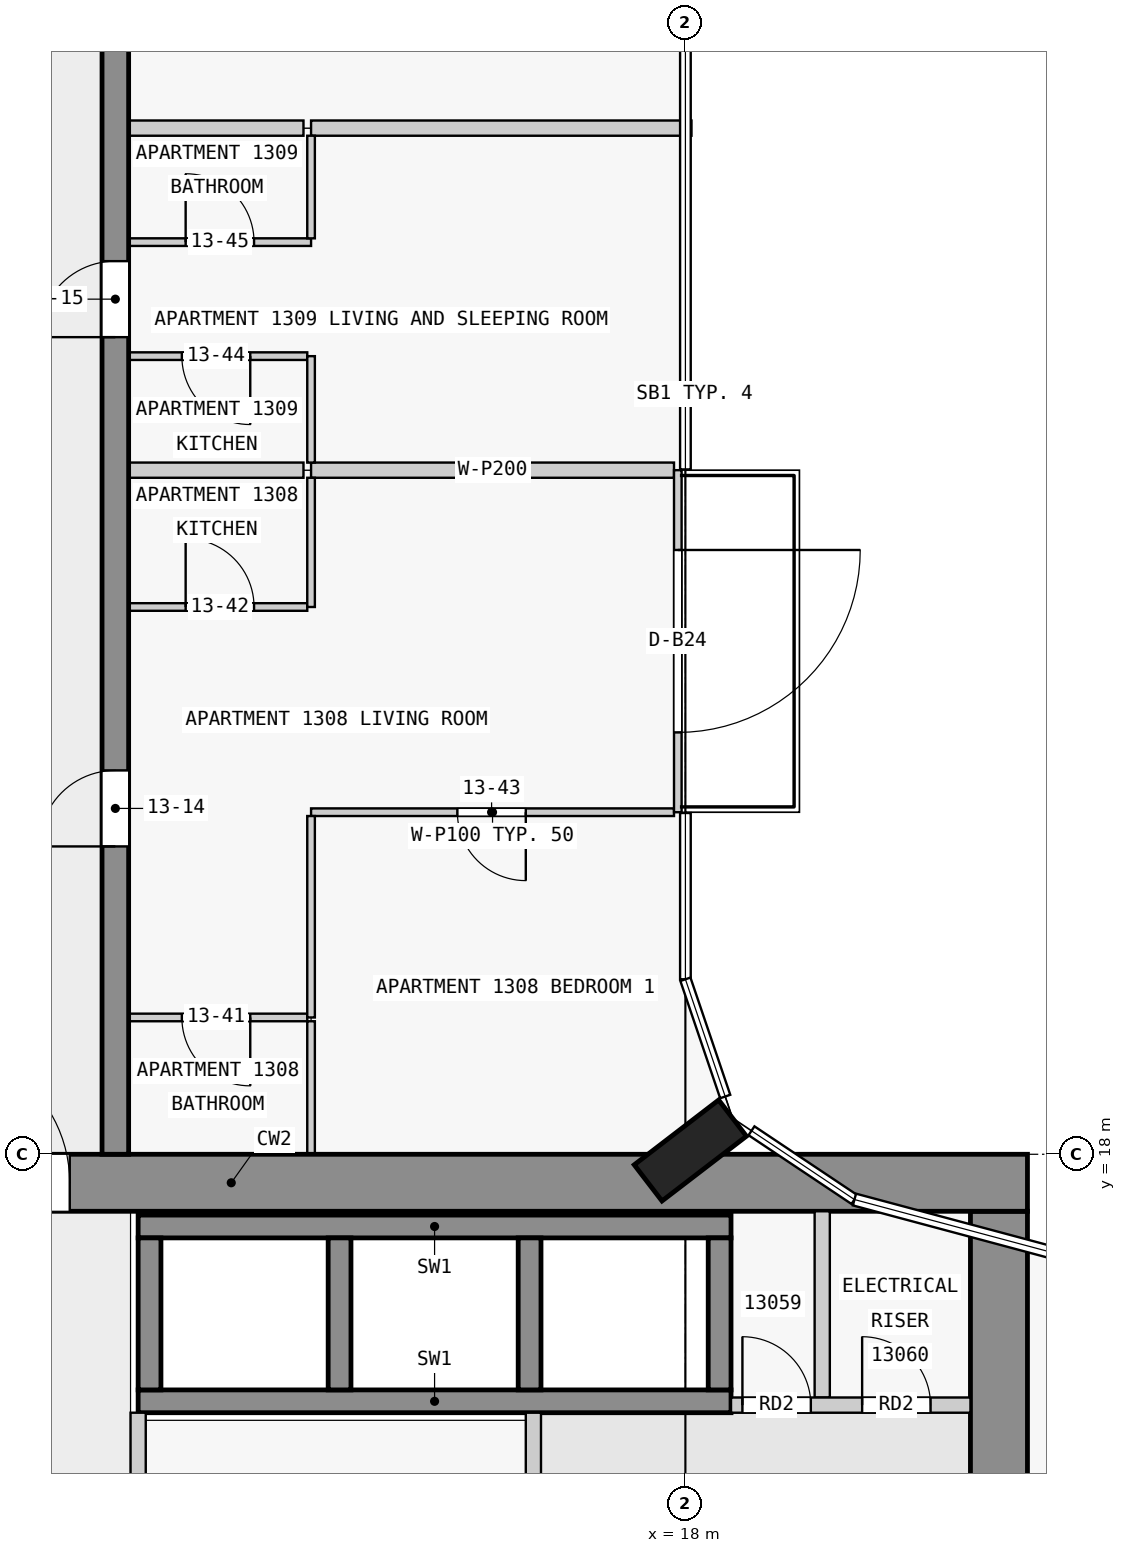
"""IFC4 building model, lengths in metres.
Left out: names, types, materials, properties, quantities, classifications, styles, units other than length and angle.
Written with IfcOpenShell. Run it as: python <this file> out.ifc"""

import sys

from ifc_helpers import new_model, si_unit, direction, frame, frame_2d, origin, origin_2d, place, context, subcontext, project, spatial, rectangle, extrude, element, fill, save


model = new_model("IFC4")
c1 = context("Model", 3, precision=1e-05, world=origin(), true_north=direction((0.0, 1.0)))
c2 = subcontext(c1, "Body", "Model", "MODEL_VIEW")
j1 = project(units=[si_unit("LENGTHUNIT", "METRE"), si_unit("PLANEANGLEUNIT", "RADIAN")], contexts=[c1])
p1 = place(None, origin())
s1 = spatial("IfcSite", under=j1, at=p1, CompositionType="ELEMENT")
p2 = place(p1, origin())
s2 = spatial("IfcBuilding", under=s1, at=p2, CompositionType="ELEMENT")
p3 = place(p2, frame((0.0, 0.0, 54.8)))
s3 = spatial("IfcBuildingStorey", under=s2, at=p3, CompositionType="ELEMENT", Elevation=54.8)
p4 = place(p3, frame((18.065, 18.05, 0.0), z_axis=(0.0, 0.0, 1.0), x_axis=(-0.608810846443, 0.793315418515, 0.0)))
e1 = element("IfcColumn", 1, at=p4, inside=s3, PredefinedType="COLUMN", context=c2, shape_type="SweptSolid", body=[
    extrude(rectangle(XDim=0.6, YDim=1.4, at=origin_2d()), origin(), (0.0, 0.0, 1.0), 3.5),
])
p5 = place(p3, frame((1.55, 17.625, 0.0), z_axis=(0.0, 0.0, 1.0), x_axis=(1.0, 0.0, 0.0)))
e2 = element("IfcWall", 2, at=p5, inside=s3, PredefinedType="SHEAR", context=c2, shape_type="SweptSolid", body=[
    extrude(rectangle(XDim=20.95, YDim=0.75, at=frame_2d((10.475, 0.0))), origin(), (0.0, 0.0, 1.0), 3.25),
])
p6 = place(p5, frame((6.55, 0.0, 0.0)))
e3 = element("IfcOpeningElement", 3, at=p6, cuts=e2, PredefinedType="OPENING", context=c2, shape_type="SweptSolid", body=[
    extrude(rectangle(XDim=1.8, YDim=2.1, at=frame_2d((0.9, 1.05))), frame((0.0, 0.385, 0.0), z_axis=(0.0, -1.0, 0.0), x_axis=(1.0, 0.0, 0.0)), (0.0, 0.0, 1.0), 0.77),
])
p7 = place(p3, frame((22.125, 2.5, 0.0), z_axis=(0.0, 0.0, 1.0), x_axis=(0.0, 1.0, 0.0)))
e4 = element("IfcWall", 4, at=p7, inside=s3, PredefinedType="SHEAR", context=c2, shape_type="SweptSolid", body=[
    extrude(rectangle(XDim=14.75, YDim=0.75, at=frame_2d((7.375, 0.0))), origin(), (0.0, 0.0, 1.0), 3.25),
])
p8 = place(p7, frame((5.6, 0.0, 0.0)))
e5 = element("IfcOpeningElement", 5, at=p8, cuts=e4, PredefinedType="OPENING", context=c2, shape_type="SweptSolid", body=[
    extrude(rectangle(XDim=1.8, YDim=2.1, at=frame_2d((0.9, 1.05))), frame((0.0, 0.385, 0.0), z_axis=(0.0, -1.0, 0.0), x_axis=(1.0, 0.0, 0.0)), (0.0, 0.0, 1.0), 0.77),
])
for number, where, z_axis, x_axis in (
    (6, (10.8, 17.05, 0.0), (0.0, 0.0, 1.0), (1.0, 0.0, 0.0)),
    (7, (10.8, 14.75, 0.0), (0.0, 0.0, 1.0), (1.0, 0.0, 0.0)),
):
    element("IfcWall", number, at=place(p3, frame(where, z_axis=z_axis, x_axis=x_axis)), inside=s3, PredefinedType="SHEAR", context=c2, shape_type="SweptSolid", body=[
        extrude(rectangle(XDim=7.8, YDim=0.3, at=frame_2d((3.9, 0.0))), origin(), (0.0, 0.0, 1.0), 3.25),
    ])
for number, where, z_axis, x_axis in (
    (8, (10.95, 14.9, 0.0), (0.0, 0.0, 1.0), (0.0, 1.0, 0.0)),
    (9, (13.45, 14.9, 0.0), (0.0, 0.0, 1.0), (0.0, 1.0, 0.0)),
    (10, (15.95, 14.9, 0.0), (0.0, 0.0, 1.0), (0.0, 1.0, 0.0)),
    (11, (18.45, 14.9, 0.0), (0.0, 0.0, 1.0), (0.0, 1.0, 0.0)),
):
    element("IfcWall", number, at=place(p3, frame(where, z_axis=z_axis, x_axis=x_axis)), inside=s3, PredefinedType="SHEAR", context=c2, shape_type="SweptSolid", body=[
        extrude(rectangle(XDim=2.0, YDim=0.3, at=frame_2d((1.0, 0.0))), origin(), (0.0, 0.0, 1.0), 3.25),
    ])
p9 = place(p3, frame((10.5, 18.0, 0.0), z_axis=(0.0, 0.0, 1.0), x_axis=(0.0, 1.0, 0.0)))
e12 = element("IfcWall", 12, at=p9, inside=s3, PredefinedType="SHEAR", context=c2, shape_type="SweptSolid", body=[
    extrude(rectangle(XDim=27.0, YDim=0.35, at=frame_2d((13.5, 0.0))), origin(), (0.0, 0.0, 1.0), 3.25),
])
p10 = place(p9, frame((4.05, 0.0, 0.0)))
e13 = element("IfcOpeningElement", 13, at=p10, cuts=e12, PredefinedType="OPENING", context=c2, shape_type="SweptSolid", body=[
    extrude(rectangle(XDim=1.0, YDim=2.1, at=frame_2d((0.5, 1.05))), frame((0.0, 0.185, 0.0), z_axis=(0.0, -1.0, 0.0), x_axis=(1.0, 0.0, 0.0)), (0.0, 0.0, 1.0), 0.37),
])
p11 = place(p9, frame((10.75, 0.0, 0.0)))
e14 = element("IfcOpeningElement", 14, at=p11, cuts=e12, PredefinedType="OPENING", context=c2, shape_type="SweptSolid", body=[
    extrude(rectangle(XDim=1.0, YDim=2.1, at=frame_2d((0.5, 1.05))), frame((0.0, 0.185, 0.0), z_axis=(0.0, -1.0, 0.0), x_axis=(1.0, 0.0, 0.0)), (0.0, 0.0, 1.0), 0.37),
])
p12 = place(p9, frame((15.25, 0.0, 0.0)))
e15 = element("IfcOpeningElement", 15, at=p12, cuts=e12, PredefinedType="OPENING", context=c2, shape_type="SweptSolid", body=[
    extrude(rectangle(XDim=1.0, YDim=2.1, at=frame_2d((0.5, 1.05))), frame((0.0, 0.185, 0.0), z_axis=(0.0, -1.0, 0.0), x_axis=(1.0, 0.0, 0.0)), (0.0, 0.0, 1.0), 0.37),
])
p13 = place(p9, frame((19.75, 0.0, 0.0)))
e16 = element("IfcOpeningElement", 16, at=p13, cuts=e12, PredefinedType="OPENING", context=c2, shape_type="SweptSolid", body=[
    extrude(rectangle(XDim=1.0, YDim=2.1, at=frame_2d((0.5, 1.05))), frame((0.0, 0.185, 0.0), z_axis=(0.0, -1.0, 0.0), x_axis=(1.0, 0.0, 0.0)), (0.0, 0.0, 1.0), 0.37),
])
p14 = place(p9, frame((23.25, 0.0, 0.0)))
e17 = element("IfcOpeningElement", 17, at=p14, cuts=e12, PredefinedType="OPENING", context=c2, shape_type="SweptSolid", body=[
    extrude(rectangle(XDim=0.9, YDim=2.1, at=frame_2d((0.45, 1.05))), frame((0.0, 0.185, 0.0), z_axis=(0.0, -1.0, 0.0), x_axis=(1.0, 0.0, 0.0)), (0.0, 0.0, 1.0), 0.37),
])
p15 = place(p9, frame((25.45, 0.0, 0.0)))
e18 = element("IfcOpeningElement", 18, at=p15, cuts=e12, PredefinedType="OPENING", context=c2, shape_type="SweptSolid", body=[
    extrude(rectangle(XDim=1.0, YDim=2.1, at=frame_2d((0.5, 1.05))), frame((0.0, 0.185, 0.0), z_axis=(0.0, -1.0, 0.0), x_axis=(1.0, 0.0, 0.0)), (0.0, 0.0, 1.0), 0.37),
])
p16 = place(p3, frame((17.9, 27.0, 0.0), z_axis=(0.0, 0.0, 1.0), x_axis=(0.0, -1.0, 0.0)))
e19 = element("IfcWall", 19, at=p16, inside=s3, PredefinedType="STANDARD", context=c2, shape_type="SweptSolid", body=[
    extrude(rectangle(XDim=4.5, YDim=0.1, at=frame_2d((2.25, 0.0))), origin(), (0.0, 0.0, 1.0), 3.25),
])
p17 = place(p16, frame((1.05, 0.0, 0.0)))
e20 = element("IfcOpeningElement", 20, at=p17, cuts=e19, PredefinedType="OPENING", context=c2, shape_type="SweptSolid", body=[
    extrude(rectangle(XDim=2.4, YDim=2.4, at=frame_2d((1.2, 1.2))), frame((0.0, 0.06, 0.0), z_axis=(0.0, -1.0, 0.0), x_axis=(1.0, 0.0, 0.0)), (0.0, 0.0, 1.0), 0.12),
])
p18 = place(p3, frame((10.8, 8.4, 0.0), z_axis=(0.0, 0.0, 1.0), x_axis=(0.0, 1.0, 0.0)))
e21 = element("IfcWall", 21, at=p18, inside=s3, PredefinedType="PARTITIONING", context=c2, shape_type="SweptSolid", body=[
    extrude(rectangle(XDim=6.2, YDim=0.2, at=frame_2d((3.1, 0.0))), origin(), (0.0, 0.0, 1.0), 3.25),
])
p19 = place(p3, frame((16.0, 8.4, 0.0), z_axis=(0.0, 0.0, 1.0), x_axis=(0.0, 1.0, 0.0)))
e22 = element("IfcWall", 22, at=p19, inside=s3, PredefinedType="PARTITIONING", context=c2, shape_type="SweptSolid", body=[
    extrude(rectangle(XDim=6.2, YDim=0.2, at=frame_2d((3.1, 0.0))), origin(), (0.0, 0.0, 1.0), 3.25),
])
p20 = place(p19, frame((3.15, 0.0, 0.0)))
e23 = element("IfcOpeningElement", 23, at=p20, cuts=e22, PredefinedType="OPENING", context=c2, shape_type="SweptSolid", body=[
    extrude(rectangle(XDim=0.9, YDim=2.1, at=frame_2d((0.45, 1.05))), frame((0.0, 0.11, 0.0), z_axis=(0.0, -1.0, 0.0), x_axis=(1.0, 0.0, 0.0)), (0.0, 0.0, 1.0), 0.22),
])
p21 = place(p3, frame((18.6, 14.7, 0.0), z_axis=(0.0, 0.0, 1.0), x_axis=(1.0, 0.0, 0.0)))
e24 = element("IfcWall", 24, at=p21, inside=s3, PredefinedType="PARTITIONING", context=c2, shape_type="SweptSolid", body=[
    extrude(rectangle(XDim=3.15, YDim=0.2, at=frame_2d((1.575, 0.0))), origin(), (0.0, 0.0, 1.0), 3.25),
])
p22 = place(p21, frame((0.15, 0.0, 0.0)))
e25 = element("IfcOpeningElement", 25, at=p22, cuts=e24, PredefinedType="OPENING", context=c2, shape_type="SweptSolid", body=[
    extrude(rectangle(XDim=0.9, YDim=2.1, at=frame_2d((0.45, 1.05))), frame((0.0, 0.11, 0.0), z_axis=(0.0, -1.0, 0.0), x_axis=(1.0, 0.0, 0.0)), (0.0, 0.0, 1.0), 0.22),
])
p23 = place(p21, frame((1.725, 0.0, 0.0)))
e26 = element("IfcOpeningElement", 26, at=p23, cuts=e24, PredefinedType="OPENING", context=c2, shape_type="SweptSolid", body=[
    extrude(rectangle(XDim=0.9, YDim=2.1, at=frame_2d((0.45, 1.05))), frame((0.0, 0.11, 0.0), z_axis=(0.0, -1.0, 0.0), x_axis=(1.0, 0.0, 0.0)), (0.0, 0.0, 1.0), 0.22),
])
p24 = place(p3, frame((19.8, 14.8, 0.0), z_axis=(0.0, 0.0, 1.0), x_axis=(0.0, 1.0, 0.0)))
e27 = element("IfcWall", 27, at=p24, inside=s3, PredefinedType="PARTITIONING", context=c2, shape_type="SweptSolid", body=[
    extrude(rectangle(XDim=2.45, YDim=0.2, at=frame_2d((1.225, 0.0))), origin(), (0.0, 0.0, 1.0), 3.25),
])
p25 = place(p3, frame((13.025, 19.8, 0.0), z_axis=(0.0, 0.0, 1.0), x_axis=(-1.0, 0.0, 0.0)))
e28 = element("IfcWall", 28, at=p25, inside=s3, PredefinedType="PARTITIONING", context=c2, shape_type="SweptSolid", body=[
    extrude(rectangle(XDim=2.35, YDim=0.1, at=frame_2d((1.175, 0.0))), origin(), (0.0, 0.0, 1.0), 3.25),
])
p26 = place(p25, frame((0.75, 0.0, 0.0)))
e29 = element("IfcOpeningElement", 29, at=p26, cuts=e28, PredefinedType="OPENING", context=c2, shape_type="SweptSolid", body=[
    extrude(rectangle(XDim=0.9, YDim=2.1, at=frame_2d((0.45, 1.05))), frame((0.0, 0.06, 0.0), z_axis=(0.0, -1.0, 0.0), x_axis=(1.0, 0.0, 0.0)), (0.0, 0.0, 1.0), 0.12),
])
p27 = place(p3, frame((17.85, 22.5, 0.0), z_axis=(0.0, 0.0, 1.0), x_axis=(-1.0, 0.0, 0.0)))
e30 = element("IfcWall", 30, at=p27, inside=s3, PredefinedType="PARTITIONING", context=c2, shape_type="SweptSolid", body=[
    extrude(rectangle(XDim=4.775, YDim=0.1, at=frame_2d((2.388, 0.0))), origin(), (0.0, 0.0, 1.0), 3.25),
])
p28 = place(p27, frame((1.95, 0.0, 0.0)))
e31 = element("IfcOpeningElement", 31, at=p28, cuts=e30, PredefinedType="OPENING", context=c2, shape_type="SweptSolid", body=[
    extrude(rectangle(XDim=0.9, YDim=2.1, at=frame_2d((0.45, 1.05))), frame((0.0, 0.06, 0.0), z_axis=(0.0, -1.0, 0.0), x_axis=(1.0, 0.0, 0.0)), (0.0, 0.0, 1.0), 0.12),
])
p29 = place(p3, frame((10.675, 25.2, 0.0), z_axis=(0.0, 0.0, 1.0), x_axis=(1.0, 0.0, 0.0)))
e32 = element("IfcWall", 32, at=p29, inside=s3, PredefinedType="PARTITIONING", context=c2, shape_type="SweptSolid", body=[
    extrude(rectangle(XDim=2.35, YDim=0.1, at=frame_2d((1.175, 0.0))), origin(), (0.0, 0.0, 1.0), 3.25),
])
p30 = place(p29, frame((0.75, 0.0, 0.0)))
e33 = element("IfcOpeningElement", 33, at=p30, cuts=e32, PredefinedType="OPENING", context=c2, shape_type="SweptSolid", body=[
    extrude(rectangle(XDim=0.9, YDim=2.1, at=frame_2d((0.45, 1.05))), frame((0.0, 0.06, 0.0), z_axis=(0.0, -1.0, 0.0), x_axis=(1.0, 0.0, 0.0)), (0.0, 0.0, 1.0), 0.12),
])
p31 = place(p3, frame((12.975, 27.0, 0.0), z_axis=(0.0, 0.0, 1.0), x_axis=(-1.0, 0.0, 0.0)))
e34 = element("IfcWall", 34, at=p31, inside=s3, PredefinedType="PARTITIONING", context=c2, shape_type="SweptSolid", body=[
    extrude(rectangle(XDim=2.3, YDim=0.2, at=frame_2d((1.15, 0.0))), origin(), (0.0, 0.0, 1.0), 3.25),
])
p32 = place(p3, frame((13.075, 27.0, 0.0), z_axis=(0.0, 0.0, 1.0), x_axis=(1.0, 0.0, 0.0)))
e35 = element("IfcWall", 35, at=p32, inside=s3, PredefinedType="PARTITIONING", context=c2, shape_type="SweptSolid", body=[
    extrude(rectangle(XDim=4.775, YDim=0.2, at=frame_2d((2.388, 0.0))), origin(), (0.0, 0.0, 1.0), 3.25),
])
p33 = place(p3, frame((13.025, 28.5, 0.0), z_axis=(0.0, 0.0, 1.0), x_axis=(-1.0, 0.0, 0.0)))
e36 = element("IfcWall", 36, at=p33, inside=s3, PredefinedType="PARTITIONING", context=c2, shape_type="SweptSolid", body=[
    extrude(rectangle(XDim=2.35, YDim=0.1, at=frame_2d((1.175, 0.0))), origin(), (0.0, 0.0, 1.0), 3.25),
])
p34 = place(p33, frame((0.75, 0.0, 0.0)))
e37 = element("IfcOpeningElement", 37, at=p34, cuts=e36, PredefinedType="OPENING", context=c2, shape_type="SweptSolid", body=[
    extrude(rectangle(XDim=0.9, YDim=2.1, at=frame_2d((0.45, 1.05))), frame((0.0, 0.06, 0.0), z_axis=(0.0, -1.0, 0.0), x_axis=(1.0, 0.0, 0.0)), (0.0, 0.0, 1.0), 0.12),
])
p35 = place(p3, frame((10.675, 30.0, 0.0), z_axis=(0.0, 0.0, 1.0), x_axis=(1.0, 0.0, 0.0)))
e38 = element("IfcWall", 38, at=p35, inside=s3, PredefinedType="PARTITIONING", context=c2, shape_type="SweptSolid", body=[
    extrude(rectangle(XDim=2.4, YDim=0.1, at=frame_2d((1.2, 0.0))), origin(), (0.0, 0.0, 1.0), 3.25),
])
p36 = place(p35, frame((0.75, 0.0, 0.0)))
e39 = element("IfcOpeningElement", 39, at=p36, cuts=e38, PredefinedType="OPENING", context=c2, shape_type="SweptSolid", body=[
    extrude(rectangle(XDim=0.9, YDim=2.1, at=frame_2d((0.45, 1.05))), frame((0.0, 0.06, 0.0), z_axis=(0.0, -1.0, 0.0), x_axis=(1.0, 0.0, 0.0)), (0.0, 0.0, 1.0), 0.12),
])
p37 = place(p3, frame((12.975, 31.5, 0.0), z_axis=(0.0, 0.0, 1.0), x_axis=(-1.0, 0.0, 0.0)))
e40 = element("IfcWall", 40, at=p37, inside=s3, PredefinedType="PARTITIONING", context=c2, shape_type="SweptSolid", body=[
    extrude(rectangle(XDim=2.3, YDim=0.2, at=frame_2d((1.15, 0.0))), origin(), (0.0, 0.0, 1.0), 3.25),
])
p38 = place(p3, frame((13.075, 31.5, 0.0), z_axis=(0.0, 0.0, 1.0), x_axis=(1.0, 0.0, 0.0)))
e41 = element("IfcWall", 41, at=p38, inside=s3, PredefinedType="PARTITIONING", context=c2, shape_type="SweptSolid", body=[
    extrude(rectangle(XDim=5.005, YDim=0.2, at=frame_2d((2.502, 0.0))), origin(), (0.0, 0.0, 1.0), 3.25),
])
p39 = place(p3, frame((13.075, 22.45, 0.0), z_axis=(0.0, 0.0, 1.0), x_axis=(0.0, -1.0, 0.0)))
e42 = element("IfcWall", 42, at=p39, inside=s3, PredefinedType="PARTITIONING", context=c2, shape_type="SweptSolid", body=[
    extrude(rectangle(XDim=2.65, YDim=0.1, at=frame_2d((1.325, 0.0))), origin(), (0.0, 0.0, 1.0), 3.25),
])
p40 = place(p3, frame((13.075, 18.0, 0.0), z_axis=(0.0, 0.0, 1.0), x_axis=(0.0, 1.0, 0.0)))
e43 = element("IfcWall", 43, at=p40, inside=s3, PredefinedType="PARTITIONING", context=c2, shape_type="SweptSolid", body=[
    extrude(rectangle(XDim=1.75, YDim=0.1, at=frame_2d((0.875, 0.0))), origin(), (0.0, 0.0, 1.0), 3.25),
])
p41 = place(p3, frame((13.075, 25.2, 0.0), z_axis=(0.0, 0.0, 1.0), x_axis=(0.0, 1.0, 0.0)))
e44 = element("IfcWall", 44, at=p41, inside=s3, PredefinedType="PARTITIONING", context=c2, shape_type="SweptSolid", body=[
    extrude(rectangle(XDim=1.7, YDim=0.1, at=frame_2d((0.85, 0.0))), origin(), (0.0, 0.0, 1.0), 3.25),
])
p42 = place(p3, frame((13.075, 27.1, 0.0), z_axis=(0.0, 0.0, 1.0), x_axis=(0.0, 1.0, 0.0)))
e45 = element("IfcWall", 45, at=p42, inside=s3, PredefinedType="PARTITIONING", context=c2, shape_type="SweptSolid", body=[
    extrude(rectangle(XDim=1.4, YDim=0.1, at=frame_2d((0.7, 0.0))), origin(), (0.0, 0.0, 1.0), 3.25),
])
p43 = place(p3, frame((13.075, 30.05, 0.0), z_axis=(0.0, 0.0, 1.0), x_axis=(0.0, 1.0, 0.0)))
e46 = element("IfcWall", 46, at=p43, inside=s3, PredefinedType="PARTITIONING", context=c2, shape_type="SweptSolid", body=[
    extrude(rectangle(XDim=1.35, YDim=0.1, at=frame_2d((0.675, 0.0))), origin(), (0.0, 0.0, 1.0), 3.25),
])
p44 = place(p17, origin())
e47 = element("IfcDoor", 47, at=p44, inside=s3, OperationType="SINGLE_SWING_LEFT", PredefinedType="DOOR", context=c2, shape_type="SweptSolid", body=[
    extrude(rectangle(XDim=2.4, YDim=2.4, at=frame_2d((1.2, 1.2))), frame((0.0, 0.025, 0.0), z_axis=(0.0, -1.0, 0.0), x_axis=(1.0, 0.0, 0.0)), (0.0, 0.0, 1.0), 0.05),
])
fill(e20, e47)
p45 = place(p6, origin())
e48 = element("IfcDoor", 48, at=p45, inside=s3, OperationType="DOUBLE_DOOR_SINGLE_SWING", PredefinedType="DOOR", context=c2, shape_type="SweptSolid", body=[
    extrude(rectangle(XDim=1.8, YDim=2.1, at=frame_2d((0.9, 1.05))), frame((0.0, 0.025, 0.0), z_axis=(0.0, -1.0, 0.0), x_axis=(1.0, 0.0, 0.0)), (0.0, 0.0, 1.0), 0.05),
])
fill(e3, e48)
p46 = place(p22, origin())
e49 = element("IfcDoor", 49, at=p46, inside=s3, OperationType="SINGLE_SWING_LEFT", PredefinedType="DOOR", context=c2, shape_type="SweptSolid", body=[
    extrude(rectangle(XDim=0.9, YDim=2.1, at=frame_2d((0.45, 1.05))), frame((0.0, 0.025, 0.0), z_axis=(0.0, -1.0, 0.0), x_axis=(1.0, 0.0, 0.0)), (0.0, 0.0, 1.0), 0.05),
])
fill(e25, e49)
p47 = place(p23, origin())
e50 = element("IfcDoor", 50, at=p47, inside=s3, OperationType="SINGLE_SWING_LEFT", PredefinedType="DOOR", context=c2, shape_type="SweptSolid", body=[
    extrude(rectangle(XDim=0.9, YDim=2.1, at=frame_2d((0.45, 1.05))), frame((0.0, 0.025, 0.0), z_axis=(0.0, -1.0, 0.0), x_axis=(1.0, 0.0, 0.0)), (0.0, 0.0, 1.0), 0.05),
])
fill(e26, e50)
p48 = place(p10, origin())
e51 = element("IfcDoor", 51, at=p48, inside=s3, OperationType="SINGLE_SWING_LEFT", PredefinedType="DOOR", context=c2, shape_type="SweptSolid", body=[
    extrude(rectangle(XDim=1.0, YDim=2.1, at=frame_2d((0.5, 1.05))), frame((0.0, 0.025, 0.0), z_axis=(0.0, -1.0, 0.0), x_axis=(1.0, 0.0, 0.0)), (0.0, 0.0, 1.0), 0.05),
])
fill(e13, e51)
p49 = place(p11, origin())
e52 = element("IfcDoor", 52, at=p49, inside=s3, OperationType="SINGLE_SWING_LEFT", PredefinedType="DOOR", context=c2, shape_type="SweptSolid", body=[
    extrude(rectangle(XDim=1.0, YDim=2.1, at=frame_2d((0.5, 1.05))), frame((0.0, 0.025, 0.0), z_axis=(0.0, -1.0, 0.0), x_axis=(1.0, 0.0, 0.0)), (0.0, 0.0, 1.0), 0.05),
])
fill(e14, e52)
p50 = place(p26, origin())
e53 = element("IfcDoor", 53, at=p50, inside=s3, OperationType="SINGLE_SWING_RIGHT", PredefinedType="DOOR", context=c2, shape_type="SweptSolid", body=[
    extrude(rectangle(XDim=0.9, YDim=2.1, at=frame_2d((0.45, 1.05))), frame((0.0, 0.025, 0.0), z_axis=(0.0, -1.0, 0.0), x_axis=(1.0, 0.0, 0.0)), (0.0, 0.0, 1.0), 0.05),
])
fill(e29, e53)
p51 = place(p30, origin())
e54 = element("IfcDoor", 54, at=p51, inside=s3, OperationType="SINGLE_SWING_RIGHT", PredefinedType="DOOR", context=c2, shape_type="SweptSolid", body=[
    extrude(rectangle(XDim=0.9, YDim=2.1, at=frame_2d((0.45, 1.05))), frame((0.0, 0.025, 0.0), z_axis=(0.0, -1.0, 0.0), x_axis=(1.0, 0.0, 0.0)), (0.0, 0.0, 1.0), 0.05),
])
fill(e33, e54)
p52 = place(p28, origin())
e55 = element("IfcDoor", 55, at=p52, inside=s3, OperationType="SINGLE_SWING_RIGHT", PredefinedType="DOOR", context=c2, shape_type="SweptSolid", body=[
    extrude(rectangle(XDim=0.9, YDim=2.1, at=frame_2d((0.45, 1.05))), frame((0.0, 0.025, 0.0), z_axis=(0.0, -1.0, 0.0), x_axis=(1.0, 0.0, 0.0)), (0.0, 0.0, 1.0), 0.05),
])
fill(e31, e55)
p53 = place(p34, origin())
e56 = element("IfcDoor", 56, at=p53, inside=s3, OperationType="SINGLE_SWING_RIGHT", PredefinedType="DOOR", context=c2, shape_type="SweptSolid", body=[
    extrude(rectangle(XDim=0.9, YDim=2.1, at=frame_2d((0.45, 1.05))), frame((0.0, 0.025, 0.0), z_axis=(0.0, -1.0, 0.0), x_axis=(1.0, 0.0, 0.0)), (0.0, 0.0, 1.0), 0.05),
])
fill(e37, e56)
p54 = place(p36, origin())
e57 = element("IfcDoor", 57, at=p54, inside=s3, OperationType="SINGLE_SWING_RIGHT", PredefinedType="DOOR", context=c2, shape_type="SweptSolid", body=[
    extrude(rectangle(XDim=0.9, YDim=2.1, at=frame_2d((0.45, 1.05))), frame((0.0, 0.025, 0.0), z_axis=(0.0, -1.0, 0.0), x_axis=(1.0, 0.0, 0.0)), (0.0, 0.0, 1.0), 0.05),
])
fill(e39, e57)
save(model, sys.argv[1])
